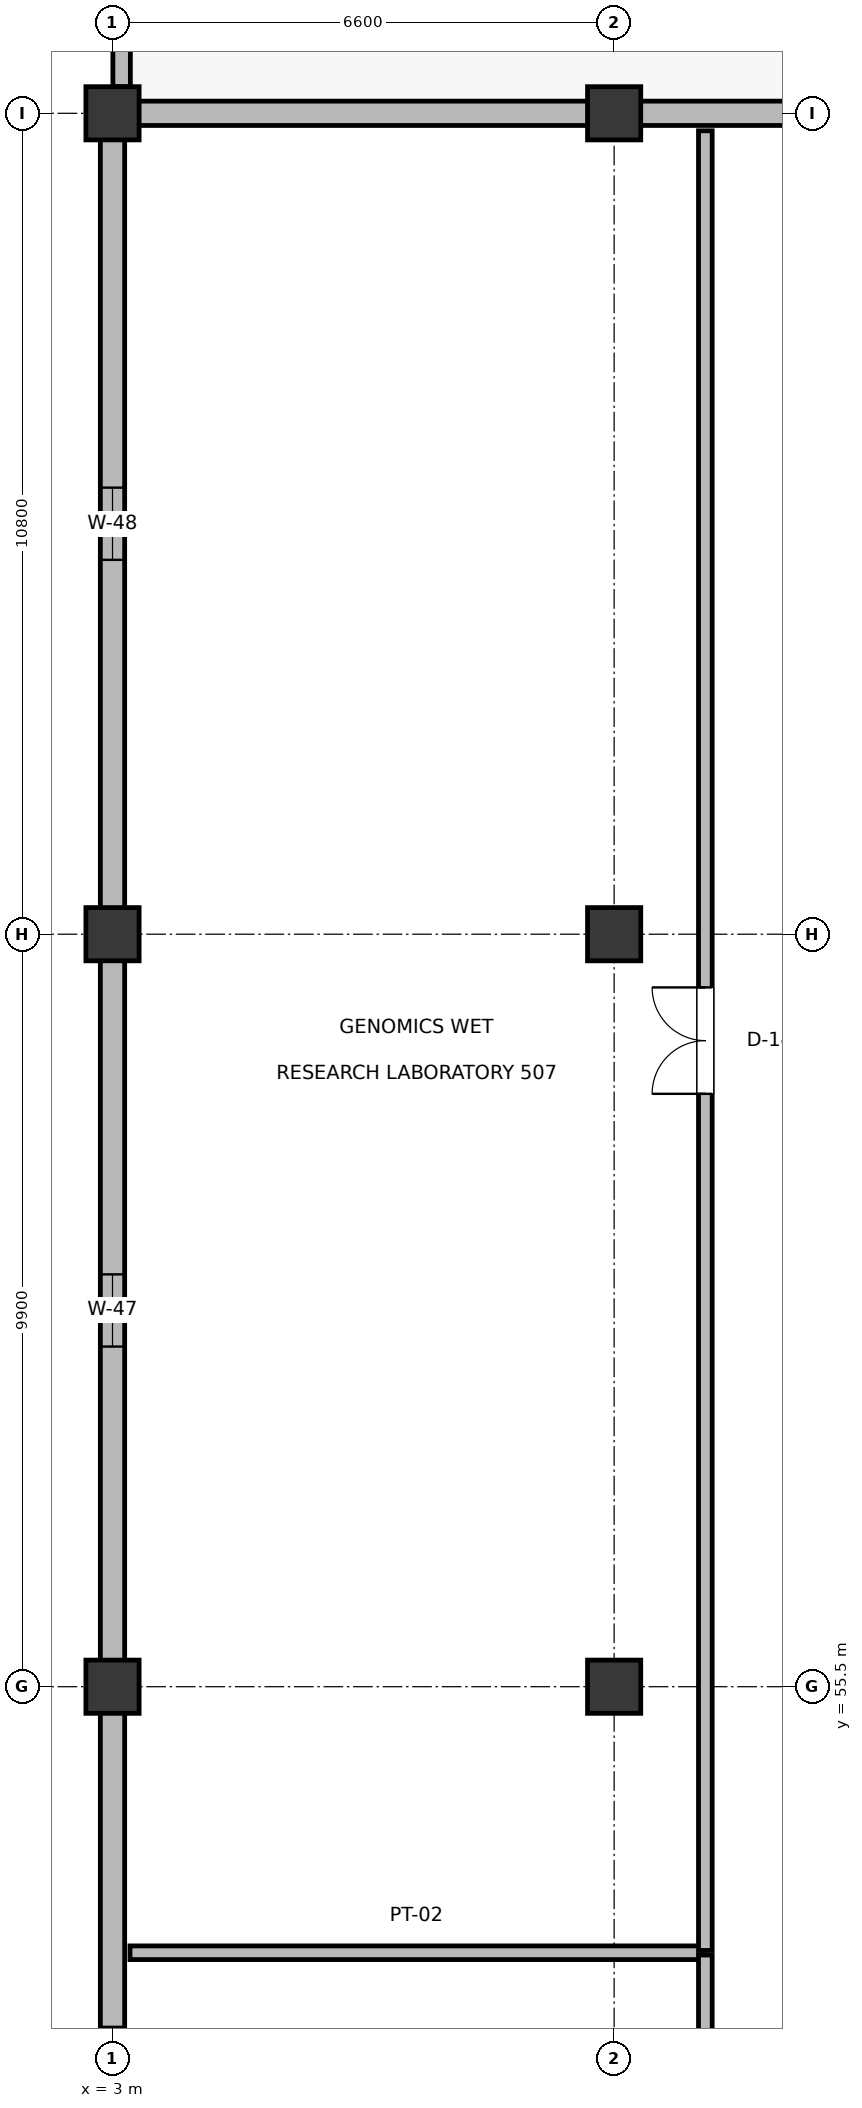
"""IFC4 building model, lengths in metres.
Left out: names, types, materials, properties, quantities, classifications, styles, units other than length and angle.
Written with IfcOpenShell. Run it as: python <this file> out.ifc"""

import sys

from ifc_helpers import new_model, si_unit, direction, frame, frame_2d, origin, origin_2d, place, context, subcontext, project, spatial, rectangle, extrude, element, fill, save


model = new_model("IFC4")
c1 = context("Model", 3, precision=1e-05, world=origin(), true_north=direction((0.0, 1.0)))
c2 = subcontext(c1, "Body", "Model", "MODEL_VIEW")
j1 = project(units=[si_unit("LENGTHUNIT", "METRE"), si_unit("PLANEANGLEUNIT", "RADIAN")], contexts=[c1])
p1 = place(None, origin())
s1 = spatial("IfcSite", under=j1, at=p1, CompositionType="ELEMENT")
p2 = place(p1, origin())
s2 = spatial("IfcBuilding", under=s1, at=p2, CompositionType="ELEMENT")
p3 = place(p2, frame((0.0, 0.0, 24.0)))
s3 = spatial("IfcBuildingStorey", under=s2, at=p3, CompositionType="ELEMENT", Elevation=24.0)
for number, where, z_axis, x_axis in (
    (1, (3.0, 55.5, 0.0), (0.0, 0.0, 1.0), (1.0, 0.0, 0.0)),
    (2, (3.0, 65.4, 0.0), (0.0, 0.0, 1.0), (1.0, 0.0, 0.0)),
    (3, (3.0, 76.2, 0.0), (0.0, 0.0, 1.0), (1.0, 0.0, 0.0)),
    (4, (9.6, 55.5, 0.0), (0.0, 0.0, 1.0), (1.0, 0.0, 0.0)),
    (5, (9.6, 65.4, 0.0), (0.0, 0.0, 1.0), (1.0, 0.0, 0.0)),
    (6, (9.6, 76.2, 0.0), (0.0, 0.0, 1.0), (1.0, 0.0, 0.0)),
):
    element("IfcColumn", number, at=place(p3, frame(where, z_axis=z_axis, x_axis=x_axis)), inside=s3, PredefinedType="COLUMN", context=c2, shape_type="SweptSolid", body=[
        extrude(rectangle(XDim=0.7, YDim=0.7, at=origin_2d()), origin(), (0.0, 0.0, 1.0), 4.5),
    ])
p4 = place(p3, frame((3.0, 45.935, 0.0), z_axis=(0.0, 0.0, 1.0), x_axis=(0.0, 1.0, 0.0)))
e7 = element("IfcWall", 7, at=p4, inside=s3, PredefinedType="SOLIDWALL", context=c2, shape_type="SweptSolid", body=[
    extrude(rectangle(XDim=9.23, YDim=0.32, at=frame_2d((4.615, 0.0))), origin(), (0.0, 0.0, 1.0), 3.495),
])
p5 = place(p4, frame((4.14, 0.0, 0.9)))
e8 = element("IfcOpeningElement", 8, at=p5, cuts=e7, PredefinedType="OPENING", context=c2, shape_type="SweptSolid", body=[
    extrude(rectangle(XDim=0.95, YDim=1.35, at=frame_2d((0.475, 0.675))), frame((0.0, 0.17, 0.0), z_axis=(0.0, -1.0, 0.0), x_axis=(1.0, 0.0, 0.0)), (0.0, 0.0, 1.0), 0.34),
])
p6 = place(p3, frame((3.0, 55.835, 0.0), z_axis=(0.0, 0.0, 1.0), x_axis=(0.0, 1.0, 0.0)))
e9 = element("IfcWall", 9, at=p6, inside=s3, PredefinedType="SOLIDWALL", context=c2, shape_type="SweptSolid", body=[
    extrude(rectangle(XDim=9.23, YDim=0.32, at=frame_2d((4.615, 0.0))), origin(), (0.0, 0.0, 1.0), 3.495),
])
p7 = place(p6, frame((4.14, 0.0, 0.9)))
e10 = element("IfcOpeningElement", 10, at=p7, cuts=e9, PredefinedType="OPENING", context=c2, shape_type="SweptSolid", body=[
    extrude(rectangle(XDim=0.95, YDim=1.55, at=frame_2d((0.475, 0.775))), frame((0.0, 0.17, 0.0), z_axis=(0.0, -1.0, 0.0), x_axis=(1.0, 0.0, 0.0)), (0.0, 0.0, 1.0), 0.34),
])
p8 = place(p3, frame((3.0, 65.735, 0.0), z_axis=(0.0, 0.0, 1.0), x_axis=(0.0, 1.0, 0.0)))
e11 = element("IfcWall", 11, at=p8, inside=s3, PredefinedType="SOLIDWALL", context=c2, shape_type="SweptSolid", body=[
    extrude(rectangle(XDim=10.13, YDim=0.32, at=frame_2d((5.065, 0.0))), origin(), (0.0, 0.0, 1.0), 3.495),
])
p9 = place(p8, frame((4.59, 0.0, 0.9)))
e12 = element("IfcOpeningElement", 12, at=p9, cuts=e11, PredefinedType="OPENING", context=c2, shape_type="SweptSolid", body=[
    extrude(rectangle(XDim=0.95, YDim=1.75, at=frame_2d((0.475, 0.875))), frame((0.0, 0.17, 0.0), z_axis=(0.0, -1.0, 0.0), x_axis=(1.0, 0.0, 0.0)), (0.0, 0.0, 1.0), 0.34),
])
p10 = place(p3, frame((3.335, 76.2, 0.0), z_axis=(0.0, 0.0, 1.0), x_axis=(1.0, 0.0, 0.0)))
e13 = element("IfcWall", 13, at=p10, inside=s3, PredefinedType="SOLIDWALL", context=c2, shape_type="SweptSolid", body=[
    extrude(rectangle(XDim=19.13, YDim=0.32, at=frame_2d((9.565, 0.0))), origin(), (0.0, 0.0, 1.0), 3.395),
])
p11 = place(p10, frame((8.89, 0.0, 0.95)))
e14 = element("IfcOpeningElement", 14, at=p11, cuts=e13, PredefinedType="OPENING", context=c2, shape_type="SweptSolid", body=[
    extrude(rectangle(XDim=1.35, YDim=1.35, at=frame_2d((0.675, 0.675))), frame((0.0, 0.17, 0.0), z_axis=(0.0, -1.0, 0.0), x_axis=(1.0, 0.0, 0.0)), (0.0, 0.0, 1.0), 0.34),
])
p12 = place(p3, frame((3.12, 76.55, 0.0), z_axis=(0.0, 0.0, 1.0), x_axis=(0.0, 1.0, 0.0)))
e15 = element("IfcWall", 15, at=p12, inside=s3, PredefinedType="PARAPET", context=c2, shape_type="SweptSolid", body=[
    extrude(rectangle(XDim=14.9, YDim=0.23, at=frame_2d((7.45, 0.0))), origin(), (0.0, 0.0, 1.0), 1.05),
])
p13 = place(p3, frame((3.23, 52.0, 0.0), z_axis=(0.0, 0.0, 1.0), x_axis=(1.0, 0.0, 0.0)))
e16 = element("IfcWall", 16, at=p13, inside=s3, PredefinedType="PARTITIONING", context=c2, shape_type="SweptSolid", body=[
    extrude(rectangle(XDim=7.54, YDim=0.18, at=frame_2d((3.77, 0.0))), origin(), (0.0, 0.0, 1.0), 3.345),
])
p14 = place(p3, frame((10.8, 30.03, 0.0), z_axis=(0.0, 0.0, 1.0), x_axis=(0.0, 1.0, 0.0)))
e17 = element("IfcWall", 17, at=p14, inside=s3, PredefinedType="PARTITIONING", context=c2, shape_type="SweptSolid", body=[
    extrude(rectangle(XDim=21.94, YDim=0.18, at=frame_2d((10.97, 0.0))), origin(), (0.0, 0.0, 1.0), 3.395),
])
p15 = place(p14, frame((10.445, 0.0, 0.0)))
e18 = element("IfcOpeningElement", 18, at=p15, cuts=e17, PredefinedType="OPENING", context=c2, shape_type="SweptSolid", body=[
    extrude(rectangle(XDim=1.05, YDim=2.2, at=frame_2d((0.525, 1.1))), frame((0.0, 0.1, 0.0), z_axis=(0.0, -1.0, 0.0), x_axis=(1.0, 0.0, 0.0)), (0.0, 0.0, 1.0), 0.2),
])
p16 = place(p3, frame((10.8, 52.03, 0.0), z_axis=(0.0, 0.0, 1.0), x_axis=(0.0, 1.0, 0.0)))
e19 = element("IfcWall", 19, at=p16, inside=s3, PredefinedType="PARTITIONING", context=c2, shape_type="SweptSolid", body=[
    extrude(rectangle(XDim=23.94, YDim=0.18, at=frame_2d((11.97, 0.0))), origin(), (0.0, 0.0, 1.0), 3.395),
])
p17 = place(p16, frame((11.27, 0.0, 0.0)))
e20 = element("IfcOpeningElement", 20, at=p17, cuts=e19, PredefinedType="OPENING", context=c2, shape_type="SweptSolid", body=[
    extrude(rectangle(XDim=1.4, YDim=2.2, at=frame_2d((0.7, 1.1))), frame((0.0, 0.1, 0.0), z_axis=(0.0, -1.0, 0.0), x_axis=(1.0, 0.0, 0.0)), (0.0, 0.0, 1.0), 0.2),
])
p18 = place(p5, origin())
e21 = element("IfcWindow", 21, at=p18, inside=s3, PartitioningType="DOUBLE_PANEL_VERTICAL", PredefinedType="WINDOW", context=c2, shape_type="SweptSolid", body=[
    extrude(rectangle(XDim=0.95, YDim=1.35, at=frame_2d((0.475, 0.675))), frame((0.0, 0.03, 0.0), z_axis=(0.0, -1.0, 0.0), x_axis=(1.0, 0.0, 0.0)), (0.0, 0.0, 1.0), 0.06),
])
fill(e8, e21)
p19 = place(p7, origin())
e22 = element("IfcWindow", 22, at=p19, inside=s3, PartitioningType="DOUBLE_PANEL_VERTICAL", PredefinedType="WINDOW", context=c2, shape_type="SweptSolid", body=[
    extrude(rectangle(XDim=0.95, YDim=1.55, at=frame_2d((0.475, 0.775))), frame((0.0, 0.03, 0.0), z_axis=(0.0, -1.0, 0.0), x_axis=(1.0, 0.0, 0.0)), (0.0, 0.0, 1.0), 0.06),
])
fill(e10, e22)
p20 = place(p9, origin())
e23 = element("IfcWindow", 23, at=p20, inside=s3, PartitioningType="DOUBLE_PANEL_VERTICAL", PredefinedType="WINDOW", context=c2, shape_type="SweptSolid", body=[
    extrude(rectangle(XDim=0.95, YDim=1.75, at=frame_2d((0.475, 0.875))), frame((0.0, 0.03, 0.0), z_axis=(0.0, -1.0, 0.0), x_axis=(1.0, 0.0, 0.0)), (0.0, 0.0, 1.0), 0.06),
])
fill(e12, e23)
p21 = place(p17, origin())
e24 = element("IfcDoor", 24, at=p21, inside=s3, OperationType="DOUBLE_DOOR_SINGLE_SWING", PredefinedType="DOOR", context=c2, shape_type="SweptSolid", body=[
    extrude(rectangle(XDim=1.4, YDim=2.2, at=frame_2d((0.7, 1.1))), frame((0.0, 0.025, 0.0), z_axis=(0.0, -1.0, 0.0), x_axis=(1.0, 0.0, 0.0)), (0.0, 0.0, 1.0), 0.05),
])
fill(e20, e24)
save(model, sys.argv[1])
